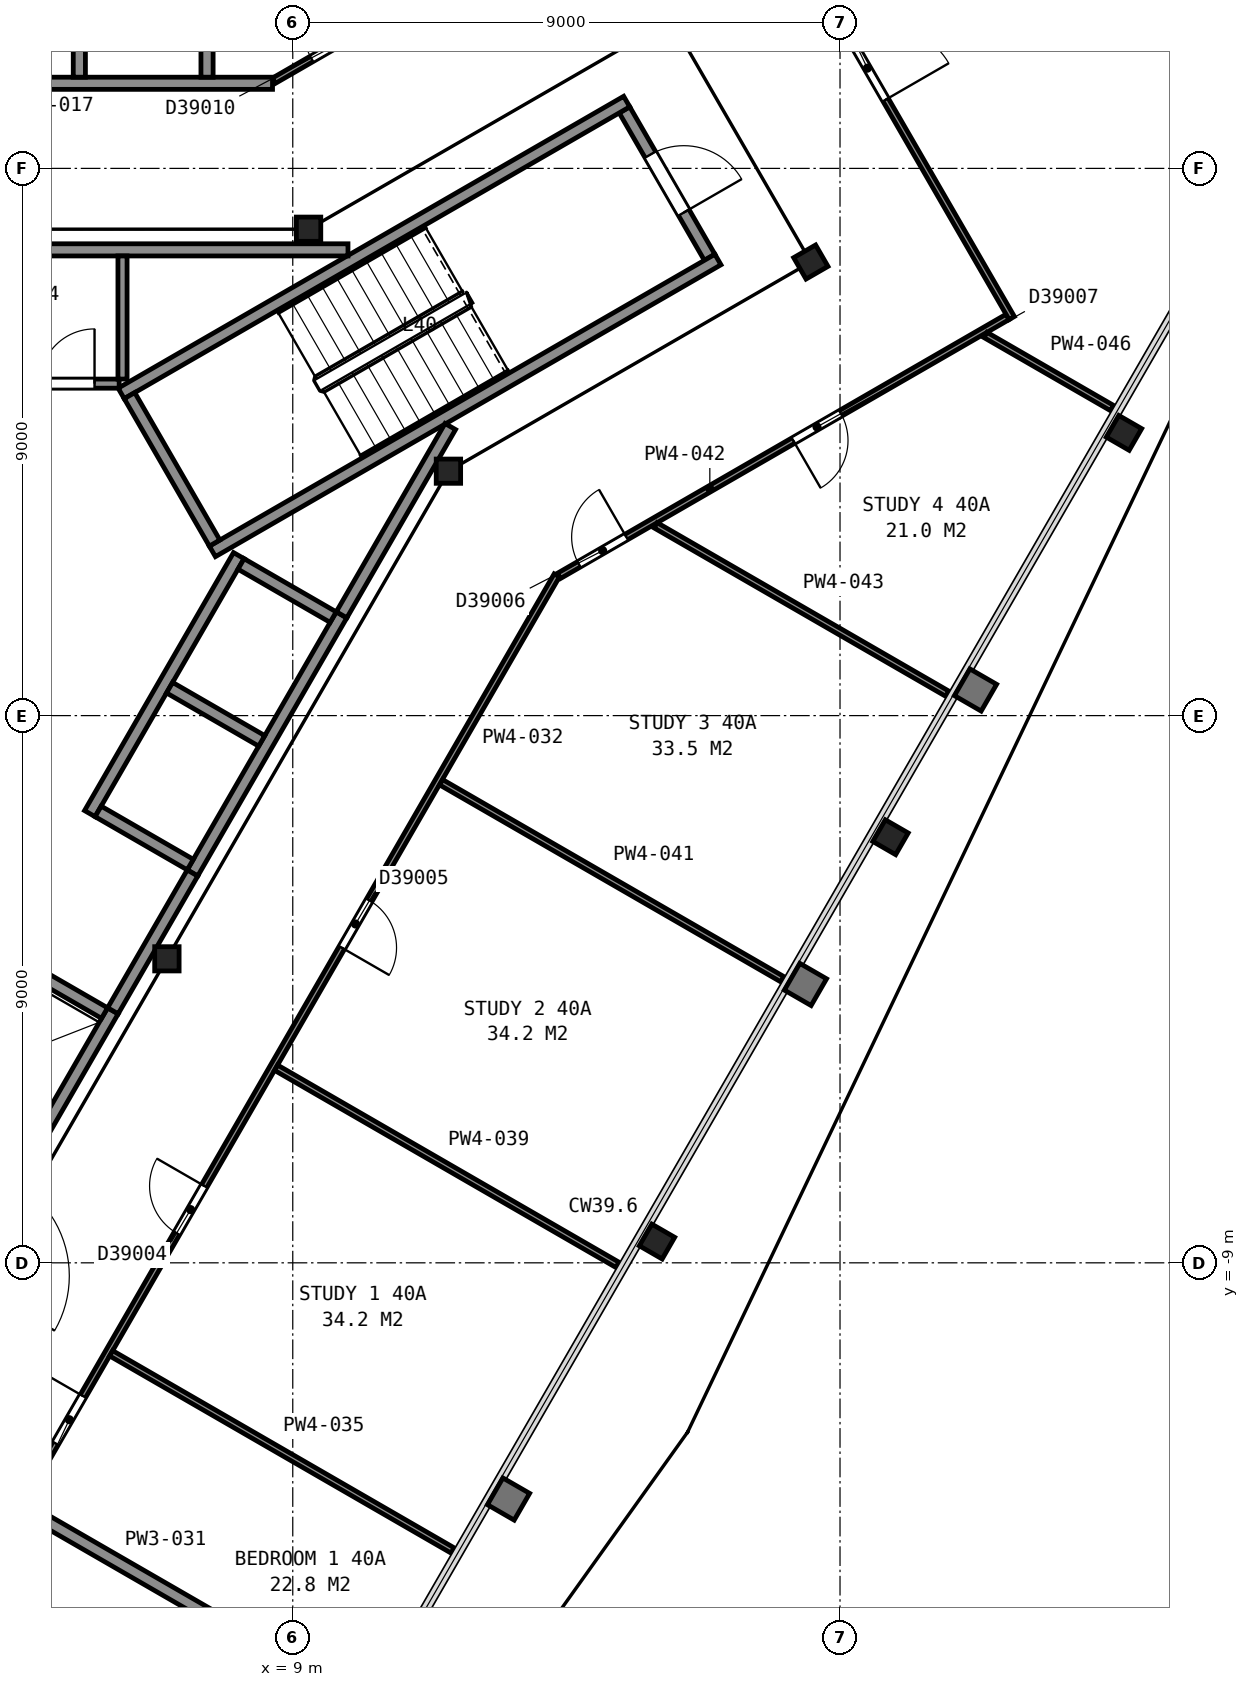
"""IFC4 building model, lengths in metres.
Left out: names, types, materials, properties, quantities, classifications, styles, units other than length and angle.
Written with IfcOpenShell. Run it as: python <this file> out.ifc"""

import sys

from ifc_helpers import new_model, si_unit, direction, frame, frame_2d, origin, origin_2d, place, context, subcontext, project, spatial, rectangle, i_section, extrude, element, fill, save


model = new_model("IFC4")
c1 = context("Model", 3, precision=1e-05, world=origin(), true_north=direction((0.0, 1.0)))
c2 = subcontext(c1, "Body", "Model", "MODEL_VIEW")
j1 = project(units=[si_unit("LENGTHUNIT", "METRE"), si_unit("PLANEANGLEUNIT", "RADIAN")], contexts=[c1])
p1 = place(None, origin())
s1 = spatial("IfcSite", under=j1, at=p1, CompositionType="ELEMENT")
p2 = place(p1, origin())
s2 = spatial("IfcBuilding", under=s1, at=p2, CompositionType="ELEMENT")
p3 = place(p2, frame((0.0, 0.0, 163.6)))
s3 = spatial("IfcBuildingStorey", under=s2, at=p3, CompositionType="ELEMENT", Elevation=163.6)
for number, where, z_axis, x_axis in (
    (1, (14.99, -8.65, 0.0), (0.0, 0.0, 1.0), (-0.5, -0.866, 0.0)),
    (2, (18.83, -2.0, 0.0), (0.0, 0.0, 1.0), (-0.5, -0.866, 0.0)),
    (3, (22.67, 4.65, 0.0), (0.0, 0.0, 1.0), (-0.5, -0.866, 0.0)),
):
    element("IfcColumn", number, at=place(p3, frame(where, z_axis=z_axis, x_axis=x_axis)), inside=s3, PredefinedType="COLUMN", context=c2, shape_type="SweptSolid", body=[
        extrude(i_section(OverallWidth=0.411, OverallDepth=0.434, WebThickness=0.036, FlangeThickness=0.057, FilletRadius=0.015, at=origin_2d()), origin(), (0.0, 0.0, 1.0), 3.7),
    ])
p4 = place(p3, frame((11.56, 4.02, 0.0), z_axis=(0.0, 0.0, 1.0), x_axis=(1.0, 0.0, 0.0)))
e4 = element("IfcColumn", 4, at=p4, inside=s3, PredefinedType="COLUMN", context=c2, shape_type="SweptSolid", body=[
    extrude(i_section(OverallWidth=0.401, OverallDepth=0.399, WebThickness=0.025, FlangeThickness=0.04, FilletRadius=0.015, at=origin_2d()), origin(), (0.0, 0.0, 1.0), 3.7),
])
p5 = place(p3, frame((17.52, 7.46, 0.0), z_axis=(0.0, 0.0, 1.0), x_axis=(0.5, -0.866025403784, 0.0)))
e5 = element("IfcColumn", 5, at=p5, inside=s3, PredefinedType="COLUMN", context=c2, shape_type="SweptSolid", body=[
    extrude(i_section(OverallWidth=0.406, OverallDepth=0.417, WebThickness=0.03, FlangeThickness=0.048, FilletRadius=0.015, at=origin_2d()), origin(), (0.0, 0.0, 1.0), 3.7),
])
for number, where, z_axis, x_axis in (
    (6, (9.26, 8.0, 0.0), (0.0, 0.0, 1.0), (1.0, 0.0, 0.0)),
    (7, (6.93, -4.0, 0.0), (0.0, 0.0, 1.0), (1.0, 0.0, 0.0)),
):
    element("IfcColumn", number, at=place(p3, frame(where, z_axis=z_axis, x_axis=x_axis)), inside=s3, PredefinedType="COLUMN", context=c2, shape_type="SweptSolid", body=[
        extrude(i_section(OverallWidth=0.401, OverallDepth=0.399, WebThickness=0.025, FlangeThickness=0.04, FilletRadius=0.015, at=origin_2d()), origin(), (0.0, 0.0, 1.0), 3.7),
    ])
p6 = place(p3, frame((15.855, 7.538, 0.0), z_axis=(0.0, 0.0, 1.0), x_axis=(-0.500049511043, 0.865996816683, 0.0)))
e8 = element("IfcWall", 8, at=p6, inside=s3, PredefinedType="PARTITIONING", context=c2, shape_type="SweptSolid", body=[
    extrude(rectangle(XDim=2.8, YDim=0.2, at=frame_2d((1.4, 0.0))), origin(), (0.0, 0.0, 1.0), 3.45),
])
p7 = place(p6, frame((0.85, 0.0, 0.0)))
e9 = element("IfcOpeningElement", 9, at=p7, cuts=e8, PredefinedType="OPENING", context=c2, shape_type="SweptSolid", body=[
    extrude(rectangle(XDim=1.1, YDim=2.1, at=frame_2d((0.55, 1.05))), frame((0.0, 0.11, 0.0), z_axis=(0.0, -1.0, 0.0), x_axis=(1.0, 0.0, 0.0)), (0.0, 0.0, 1.0), 0.22),
])
for number, where, z_axis, x_axis in (
    (10, (6.178, 5.299, 0.0), (0.0, 0.0, 1.0), (0.866, 0.5, 0.0)),
    (11, (7.678, 2.701, 0.0), (0.0, 0.0, 1.0), (0.866, 0.5, 0.0)),
):
    element("IfcWall", number, at=place(p3, frame(where, z_axis=z_axis, x_axis=x_axis)), inside=s3, PredefinedType="PARTITIONING", context=c2, shape_type="SweptSolid", body=[
        extrude(rectangle(XDim=9.6, YDim=0.2, at=frame_2d((4.8, 0.0))), origin(), (0.0, 0.0, 1.0), 3.45),
    ])
p8 = place(p3, frame((7.715, 2.838, 0.0), z_axis=(0.0, 0.0, 1.0), x_axis=(-0.500049511043, 0.865996816683, 0.0)))
e12 = element("IfcWall", 12, at=p8, inside=s3, PredefinedType="PARTITIONING", context=c2, shape_type="SweptSolid", body=[
    extrude(rectangle(XDim=2.8, YDim=0.2, at=frame_2d((1.4, 0.0))), origin(), (0.0, 0.0, 1.0), 3.45),
])
p9 = place(p3, frame((4.766, -7.065, 0.0), z_axis=(0.0, 0.0, 1.0), x_axis=(0.499948979701, 0.866054858364, 0.0)))
e13 = element("IfcWall", 13, at=p9, inside=s3, PredefinedType="PARTITIONING", context=c2, shape_type="SweptSolid", body=[
    extrude(rectangle(XDim=2.55, YDim=0.2, at=frame_2d((1.275, 0.0))), origin(), (0.0, 0.0, 1.0), 3.7),
])
p10 = place(p3, frame((7.351, -2.587, 0.0), z_axis=(0.0, 0.0, 1.0), x_axis=(0.500002801628, 0.866023786258, 0.0)))
e14 = element("IfcWall", 14, at=p10, inside=s3, PredefinedType="PARTITIONING", context=c2, shape_type="SweptSolid", body=[
    extrude(rectangle(XDim=4.9, YDim=0.2, at=frame_2d((2.45, 0.0))), origin(), (0.0, 0.0, 1.0), 3.7),
])
p11 = place(p3, frame((5.663, -1.612, 0.0), z_axis=(0.0, 0.0, 1.0), x_axis=(0.49998122708, 0.866036242063, 0.0)))
e15 = element("IfcWall", 15, at=p11, inside=s3, PredefinedType="PARTITIONING", context=c2, shape_type="SweptSolid", body=[
    extrude(rectangle(XDim=4.9, YDim=0.2, at=frame_2d((2.45, 0.0))), origin(), (0.0, 0.0, 1.0), 3.7),
])
p12 = place(p3, frame((9.665, 1.62, 0.0), z_axis=(0.0, 0.0, 1.0), x_axis=(-0.866002029911, 0.500040482552, 0.0)))
e16 = element("IfcWall", 16, at=p12, inside=s3, PredefinedType="PARTITIONING", context=c2, shape_type="SweptSolid", body=[
    extrude(rectangle(XDim=1.75, YDim=0.2, at=frame_2d((0.875, 0.0))), origin(), (0.0, 0.0, 1.0), 3.7),
])
for number, where, z_axis, x_axis in (
    (17, (8.49, -0.416, 0.0), (0.0, 0.0, 1.0), (-0.866, 0.5, 0.0)),
    (18, (7.315, -2.451, 0.0), (0.0, 0.0, 1.0), (-0.866, 0.5, 0.0)),
):
    element("IfcWall", number, at=place(p3, frame(where, z_axis=z_axis, x_axis=x_axis)), inside=s3, PredefinedType="PARTITIONING", context=c2, shape_type="SweptSolid", body=[
        extrude(rectangle(XDim=1.75, YDim=0.2, at=frame_2d((0.875, 0.0))), origin(), (0.0, 0.0, 1.0), 3.7),
    ])
p13 = place(p3, frame((5.905, -4.893, 0.0), z_axis=(0.0, 0.0, 1.0), x_axis=(-0.866002029911, 0.500040482552, 0.0)))
e19 = element("IfcWall", 19, at=p13, inside=s3, PredefinedType="PARTITIONING", context=c2, shape_type="SweptSolid", body=[
    extrude(rectangle(XDim=1.75, YDim=0.2, at=frame_2d((0.875, 0.0))), origin(), (0.0, 0.0, 1.0), 3.7),
])
p14 = place(p3, frame((-3.933, 7.66, 0.0), z_axis=(0.0, 0.0, 1.0), x_axis=(1.0, 0.0, 0.0)))
e20 = element("IfcWall", 20, at=p14, inside=s3, PredefinedType="PARTITIONING", context=c2, shape_type="SweptSolid", body=[
    extrude(rectangle(XDim=13.841, YDim=0.2, at=frame_2d((6.92, 0.0))), origin(), (0.0, 0.0, 1.0), 3.45),
])
p15 = place(p3, frame((0.925, 5.46, 0.0), z_axis=(0.0, 0.0, 1.0), x_axis=(1.0, 0.0, 0.0)))
e21 = element("IfcWall", 21, at=p15, inside=s3, PredefinedType="PARTITIONING", context=c2, shape_type="SweptSolid", body=[
    extrude(rectangle(XDim=5.22, YDim=0.15, at=frame_2d((2.61, 0.0))), origin(), (0.0, 0.0, 1.0), 3.45),
])
p16 = place(p15, frame((3.915, 0.0, 0.0)))
e22 = element("IfcOpeningElement", 22, at=p16, cuts=e21, PredefinedType="OPENING", context=c2, shape_type="SweptSolid", body=[
    extrude(rectangle(XDim=0.9, YDim=2.1, at=frame_2d((0.45, 1.05))), frame((0.0, 0.085, 0.0), z_axis=(0.0, -1.0, 0.0), x_axis=(1.0, 0.0, 0.0)), (0.0, 0.0, 1.0), 0.17),
])
p17 = place(p3, frame((6.042, -4.855, 0.0), z_axis=(0.0, 0.0, 1.0), x_axis=(0.500252727967, 0.865879442048, 0.0)))
e23 = element("IfcWall", 23, at=p17, inside=s3, PredefinedType="PARTITIONING", context=c2, shape_type="SweptSolid", body=[
    extrude(rectangle(XDim=2.617, YDim=0.2, at=frame_2d((1.309, 0.0))), origin(), (0.0, 0.0, 1.0), 3.45),
])
p18 = place(p3, frame((6.2, 5.535, 0.0), z_axis=(0.0, 0.0, 1.0), x_axis=(0.0, 1.0, 0.0)))
e24 = element("IfcWall", 24, at=p18, inside=s3, PredefinedType="PARTITIONING", context=c2, shape_type="SweptSolid", body=[
    extrude(rectangle(XDim=2.025, YDim=0.15, at=frame_2d((1.013, 0.0))), origin(), (0.0, 0.0, 1.0), 3.45),
])
p19 = place(p3, frame((9.803, 1.658, 0.0), z_axis=(0.0, 0.0, 1.0), x_axis=(0.499943114462, 0.866058244174, 0.0)))
e25 = element("IfcWall", 25, at=p19, inside=s3, PredefinedType="PARTITIONING", context=c2, shape_type="SweptSolid", body=[
    extrude(rectangle(XDim=3.576, YDim=0.2, at=frame_2d((1.788, 0.0))), origin(), (0.0, 0.0, 1.0), 3.45),
])
p20 = place(p3, frame((-8.667, 10.4, 0.0), z_axis=(0.0, 0.0, 1.0), x_axis=(1.0, 0.0, 0.0)))
e26 = element("IfcWall", 26, at=p20, inside=s3, PredefinedType="PARTITIONING", context=c2, shape_type="SweptSolid", body=[
    extrude(rectangle(XDim=17.334, YDim=0.2, at=frame_2d((8.667, 0.0))), origin(), (0.0, 0.0, 1.0), 2.713),
])
p21 = place(p20, frame((9.211, 0.0, 0.0)))
e27 = element("IfcOpeningElement", 27, at=p21, cuts=e26, PredefinedType="OPENING", context=c2, shape_type="SweptSolid", body=[
    extrude(rectangle(XDim=0.9, YDim=2.1, at=frame_2d((0.45, 1.05))), frame((0.0, 0.11, 0.0), z_axis=(0.0, -1.0, 0.0), x_axis=(1.0, 0.0, 0.0)), (0.0, 0.0, 1.0), 0.22),
])
p22 = place(p20, frame((4.857, 0.0, 0.0)))
e28 = element("IfcOpeningElement", 28, at=p22, cuts=e26, PredefinedType="OPENING", context=c2, shape_type="SweptSolid", body=[
    extrude(rectangle(XDim=0.9, YDim=2.1, at=frame_2d((0.45, 1.05))), frame((0.0, 0.11, 0.0), z_axis=(0.0, -1.0, 0.0), x_axis=(1.0, 0.0, 0.0)), (0.0, 0.0, 1.0), 0.22),
])
p23 = place(p20, frame((1.0, 0.0, 0.0)))
e29 = element("IfcOpeningElement", 29, at=p23, cuts=e26, PredefinedType="OPENING", context=c2, shape_type="SweptSolid", body=[
    extrude(rectangle(XDim=0.9, YDim=2.1, at=frame_2d((0.45, 1.05))), frame((0.0, 0.11, 0.0), z_axis=(0.0, -1.0, 0.0), x_axis=(1.0, 0.0, 0.0)), (0.0, 0.0, 1.0), 0.22),
])
p24 = place(p3, frame((4.85, -13.191, 0.0), z_axis=(0.0, 0.0, 1.0), x_axis=(0.866109679077, -0.499854002494, 0.0)))
e30 = element("IfcWall", 30, at=p24, inside=s3, PredefinedType="PARTITIONING", context=c2, shape_type="SweptSolid", body=[
    extrude(rectangle(XDim=3.16, YDim=0.2, at=frame_2d((1.58, 0.0))), origin(), (0.0, 0.0, 1.0), 2.713),
])
p25 = place(p3, frame((13.342, 2.306, 0.0), z_axis=(0.0, 0.0, 1.0), x_axis=(-0.49997635812, -0.866039053, 0.0)))
e31 = element("IfcWall", 31, at=p25, inside=s3, PredefinedType="PARTITIONING", context=c2, shape_type="SweptSolid", body=[
    extrude(rectangle(XDim=17.285, YDim=0.1, at=frame_2d((8.643, 0.0))), origin(), (0.0, 0.0, 1.0), 2.713),
])
p26 = place(p25, frame((15.585, 0.0, 0.0)))
e32 = element("IfcOpeningElement", 32, at=p26, cuts=e31, PredefinedType="OPENING", context=c2, shape_type="SweptSolid", body=[
    extrude(rectangle(XDim=0.9, YDim=2.1, at=frame_2d((0.45, 1.05))), frame((0.0, 0.06, 0.0), z_axis=(0.0, -1.0, 0.0), x_axis=(1.0, 0.0, 0.0)), (0.0, 0.0, 1.0), 0.12),
])
p27 = place(p25, frame((11.595, 0.0, 0.0)))
e33 = element("IfcOpeningElement", 33, at=p27, cuts=e31, PredefinedType="OPENING", context=c2, shape_type="SweptSolid", body=[
    extrude(rectangle(XDim=0.9, YDim=2.1, at=frame_2d((0.45, 1.05))), frame((0.0, 0.06, 0.0), z_axis=(0.0, -1.0, 0.0), x_axis=(1.0, 0.0, 0.0)), (0.0, 0.0, 1.0), 0.12),
])
p28 = place(p25, frame((6.171, 0.0, 0.0)))
e34 = element("IfcOpeningElement", 34, at=p28, cuts=e31, PredefinedType="OPENING", context=c2, shape_type="SweptSolid", body=[
    extrude(rectangle(XDim=0.9, YDim=2.1, at=frame_2d((0.45, 1.05))), frame((0.0, 0.06, 0.0), z_axis=(0.0, -1.0, 0.0), x_axis=(1.0, 0.0, 0.0)), (0.0, 0.0, 1.0), 0.12),
])
p29 = place(p3, frame((5.49, 10.5, 0.0), z_axis=(0.0, 0.0, 1.0), x_axis=(0.0, 1.0, 0.0)))
e35 = element("IfcWall", 35, at=p29, inside=s3, PredefinedType="PARTITIONING", context=c2, shape_type="SweptSolid", body=[
    extrude(rectangle(XDim=6.435, YDim=0.2, at=frame_2d((3.218, 0.0))), origin(), (0.0, 0.0, 1.0), 2.713),
])
p30 = place(p3, frame((6.013, -10.488, 0.0), z_axis=(0.0, 0.0, 1.0), x_axis=(0.86599118531, -0.500059263454, 0.0)))
e36 = element("IfcWall", 36, at=p30, inside=s3, PredefinedType="PARTITIONING", context=c2, shape_type="SweptSolid", body=[
    extrude(rectangle(XDim=6.484, YDim=0.1, at=frame_2d((3.242, 0.0))), origin(), (0.0, 0.0, 1.0), 2.713),
])
p31 = place(p3, frame((7.59, 10.5, 0.0), z_axis=(0.0, 0.0, 1.0), x_axis=(0.0, 1.0, 0.0)))
e37 = element("IfcWall", 37, at=p31, inside=s3, PredefinedType="PARTITIONING", context=c2, shape_type="SweptSolid", body=[
    extrude(rectangle(XDim=2.8, YDim=0.2, at=frame_2d((1.4, 0.0))), origin(), (0.0, 0.0, 1.0), 2.713),
])
p32 = place(p3, frame((8.691, 10.442, 0.0), z_axis=(0.0, 0.0, 1.0), x_axis=(0.866070360466, 0.499922124658, 0.0)))
e38 = element("IfcWall", 38, at=p32, inside=s3, PredefinedType="PARTITIONING", context=c2, shape_type="SweptSolid", body=[
    extrude(rectangle(XDim=8.503, YDim=0.1, at=frame_2d((4.251, 0.0))), origin(), (0.0, 0.0, 1.0), 2.713),
])
p33 = place(p32, frame((4.758, 0.0, 0.0)))
e39 = element("IfcOpeningElement", 39, at=p33, cuts=e38, PredefinedType="OPENING", context=c2, shape_type="SweptSolid", body=[
    extrude(rectangle(XDim=0.9, YDim=2.1, at=frame_2d((0.45, 1.05))), frame((0.0, 0.06, 0.0), z_axis=(0.0, -1.0, 0.0), x_axis=(1.0, 0.0, 0.0)), (0.0, 0.0, 1.0), 0.12),
])
p34 = place(p32, frame((0.715, 0.0, 0.0)))
e40 = element("IfcOpeningElement", 40, at=p34, cuts=e38, PredefinedType="OPENING", context=c2, shape_type="SweptSolid", body=[
    extrude(rectangle(XDim=0.9, YDim=2.1, at=frame_2d((0.45, 1.05))), frame((0.0, 0.06, 0.0), z_axis=(0.0, -1.0, 0.0), x_axis=(1.0, 0.0, 0.0)), (0.0, 0.0, 1.0), 0.12),
])
p35 = place(p3, frame((8.725, -5.791, 0.0), z_axis=(0.0, 0.0, 1.0), x_axis=(0.865998075994, -0.500047330135, 0.0)))
e41 = element("IfcWall", 41, at=p35, inside=s3, PredefinedType="PARTITIONING", context=c2, shape_type="SweptSolid", body=[
    extrude(rectangle(XDim=6.483, YDim=0.1, at=frame_2d((3.242, 0.0))), origin(), (0.0, 0.0, 1.0), 2.713),
])
p36 = place(p3, frame((11.441, -1.096, 0.0), z_axis=(0.0, 0.0, 1.0), x_axis=(0.866019919364, -0.500009499175, 0.0)))
e42 = element("IfcWall", 42, at=p36, inside=s3, PredefinedType="PARTITIONING", context=c2, shape_type="SweptSolid", body=[
    extrude(rectangle(XDim=6.479, YDim=0.1, at=frame_2d((3.239, 0.0))), origin(), (0.0, 0.0, 1.0), 2.713),
])
p37 = place(p3, frame((20.756, 6.557, 0.0), z_axis=(0.0, 0.0, 1.0), x_axis=(-0.866069146081, -0.499924228466, 0.0)))
e43 = element("IfcWall", 43, at=p37, inside=s3, PredefinedType="PARTITIONING", context=c2, shape_type="SweptSolid", body=[
    extrude(rectangle(XDim=8.519, YDim=0.1, at=frame_2d((4.259, 0.0))), origin(), (0.0, 0.0, 1.0), 2.713),
])
p38 = place(p37, frame((7.239, 0.0, 0.0)))
e44 = element("IfcOpeningElement", 44, at=p38, cuts=e43, PredefinedType="OPENING", context=c2, shape_type="SweptSolid", body=[
    extrude(rectangle(XDim=0.9, YDim=2.1, at=frame_2d((0.45, 1.05))), frame((0.0, 0.06, 0.0), z_axis=(0.0, -1.0, 0.0), x_axis=(1.0, 0.0, 0.0)), (0.0, 0.0, 1.0), 0.12),
])
p39 = place(p37, frame((3.169, 0.0, 0.0)))
e45 = element("IfcOpeningElement", 45, at=p39, cuts=e43, PredefinedType="OPENING", context=c2, shape_type="SweptSolid", body=[
    extrude(rectangle(XDim=0.9, YDim=2.1, at=frame_2d((0.45, 1.05))), frame((0.0, 0.06, 0.0), z_axis=(0.0, -1.0, 0.0), x_axis=(1.0, 0.0, 0.0)), (0.0, 0.0, 1.0), 0.12),
])
p40 = place(p3, frame((14.968, 3.13, 0.0), z_axis=(0.0, 0.0, 1.0), x_axis=(0.866001282423, -0.500041777097, 0.0)))
e46 = element("IfcWall", 46, at=p40, inside=s3, PredefinedType="PARTITIONING", context=c2, shape_type="SweptSolid", body=[
    extrude(rectangle(XDim=5.537, YDim=0.1, at=frame_2d((2.769, 0.0))), origin(), (0.0, 0.0, 1.0), 2.713),
])
p41 = place(p3, frame((16.073, 14.761, 0.0), z_axis=(0.0, 0.0, 1.0), x_axis=(0.500297300687, -0.865853689098, 0.0)))
e47 = element("IfcWall", 47, at=p41, inside=s3, PredefinedType="PARTITIONING", context=c2, shape_type="SweptSolid", body=[
    extrude(rectangle(XDim=9.496, YDim=0.1, at=frame_2d((4.748, 0.0))), origin(), (0.0, 0.0, 1.0), 2.713),
])
p42 = place(p41, frame((4.15, 0.0, 0.0)))
e48 = element("IfcOpeningElement", 48, at=p42, cuts=e47, PredefinedType="OPENING", context=c2, shape_type="SweptSolid", body=[
    extrude(rectangle(XDim=1.2, YDim=2.1, at=frame_2d((0.6, 1.05))), frame((0.0, 0.06, 0.0), z_axis=(0.0, -1.0, 0.0), x_axis=(1.0, 0.0, 0.0)), (0.0, 0.0, 1.0), 0.12),
])
p43 = place(p3, frame((20.392, 6.261, 0.0), z_axis=(0.0, 0.0, 1.0), x_axis=(0.865953976614, -0.500123695086, 0.0)))
e49 = element("IfcWall", 49, at=p43, inside=s3, PredefinedType="PARTITIONING", context=c2, shape_type="SweptSolid", body=[
    extrude(rectangle(XDim=2.405, YDim=0.1, at=frame_2d((1.203, 0.0))), origin(), (0.0, 0.0, 1.0), 2.713),
])
p44 = place(p7, origin())
e50 = element("IfcDoor", 50, at=p44, inside=s3, OperationType="SINGLE_SWING_LEFT", PredefinedType="DOOR", context=c2, shape_type="SweptSolid", body=[
    extrude(rectangle(XDim=1.1, YDim=2.1, at=frame_2d((0.55, 1.05))), frame((0.0, 0.025, 0.0), z_axis=(0.0, -1.0, 0.0), x_axis=(1.0, 0.0, 0.0)), (0.0, 0.0, 1.0), 0.05),
])
fill(e9, e50)
p45 = place(p16, origin())
e51 = element("IfcDoor", 51, at=p45, inside=s3, OperationType="SINGLE_SWING_RIGHT", PredefinedType="DOOR", context=c2, shape_type="SweptSolid", body=[
    extrude(rectangle(XDim=0.9, YDim=2.1, at=frame_2d((0.45, 1.05))), frame((0.0, 0.025, 0.0), z_axis=(0.0, -1.0, 0.0), x_axis=(1.0, 0.0, 0.0)), (0.0, 0.0, 1.0), 0.05),
])
fill(e22, e51)
p46 = place(p26, origin())
e52 = element("IfcDoor", 52, at=p46, inside=s3, OperationType="SINGLE_SWING_LEFT", PredefinedType="DOOR", context=c2, shape_type="SweptSolid", body=[
    extrude(rectangle(XDim=0.9, YDim=2.1, at=frame_2d((0.45, 1.05))), frame((0.0, 0.025, 0.0), z_axis=(0.0, -1.0, 0.0), x_axis=(1.0, 0.0, 0.0)), (0.0, 0.0, 1.0), 0.05),
])
fill(e32, e52)
p47 = place(p27, origin())
e53 = element("IfcDoor", 53, at=p47, inside=s3, OperationType="SINGLE_SWING_LEFT", PredefinedType="DOOR", context=c2, shape_type="SweptSolid", body=[
    extrude(rectangle(XDim=0.9, YDim=2.1, at=frame_2d((0.45, 1.05))), frame((0.0, 0.025, 0.0), z_axis=(0.0, -1.0, 0.0), x_axis=(1.0, 0.0, 0.0)), (0.0, 0.0, 1.0), 0.05),
])
fill(e33, e53)
p48 = place(p28, origin())
e54 = element("IfcDoor", 54, at=p48, inside=s3, OperationType="SINGLE_SWING_RIGHT", PredefinedType="DOOR", context=c2, shape_type="SweptSolid", body=[
    extrude(rectangle(XDim=0.9, YDim=2.1, at=frame_2d((0.45, 1.05))), frame((0.0, 0.025, 0.0), z_axis=(0.0, -1.0, 0.0), x_axis=(1.0, 0.0, 0.0)), (0.0, 0.0, 1.0), 0.05),
])
fill(e34, e54)
p49 = place(p34, origin())
e55 = element("IfcDoor", 55, at=p49, inside=s3, OperationType="SINGLE_SWING_RIGHT", PredefinedType="DOOR", context=c2, shape_type="SweptSolid", body=[
    extrude(rectangle(XDim=0.9, YDim=2.1, at=frame_2d((0.45, 1.05))), frame((0.0, 0.025, 0.0), z_axis=(0.0, -1.0, 0.0), x_axis=(1.0, 0.0, 0.0)), (0.0, 0.0, 1.0), 0.05),
])
fill(e40, e55)
p50 = place(p38, origin())
e56 = element("IfcDoor", 56, at=p50, inside=s3, OperationType="SINGLE_SWING_LEFT", PredefinedType="DOOR", context=c2, shape_type="SweptSolid", body=[
    extrude(rectangle(XDim=0.9, YDim=2.1, at=frame_2d((0.45, 1.05))), frame((0.0, 0.025, 0.0), z_axis=(0.0, -1.0, 0.0), x_axis=(1.0, 0.0, 0.0)), (0.0, 0.0, 1.0), 0.05),
])
fill(e44, e56)
p51 = place(p39, origin())
e57 = element("IfcDoor", 57, at=p51, inside=s3, OperationType="SINGLE_SWING_RIGHT", PredefinedType="DOOR", context=c2, shape_type="SweptSolid", body=[
    extrude(rectangle(XDim=0.9, YDim=2.1, at=frame_2d((0.45, 1.05))), frame((0.0, 0.025, 0.0), z_axis=(0.0, -1.0, 0.0), x_axis=(1.0, 0.0, 0.0)), (0.0, 0.0, 1.0), 0.05),
])
fill(e45, e57)
p52 = place(p42, origin())
e58 = element("IfcDoor", 58, at=p52, inside=s3, OperationType="SINGLE_SWING_RIGHT", PredefinedType="DOOR", context=c2, shape_type="SweptSolid", body=[
    extrude(rectangle(XDim=1.2, YDim=2.1, at=frame_2d((0.6, 1.05))), frame((0.0, 0.025, 0.0), z_axis=(0.0, -1.0, 0.0), x_axis=(1.0, 0.0, 0.0)), (0.0, 0.0, 1.0), 0.05),
])
fill(e48, e58)
save(model, sys.argv[1])
